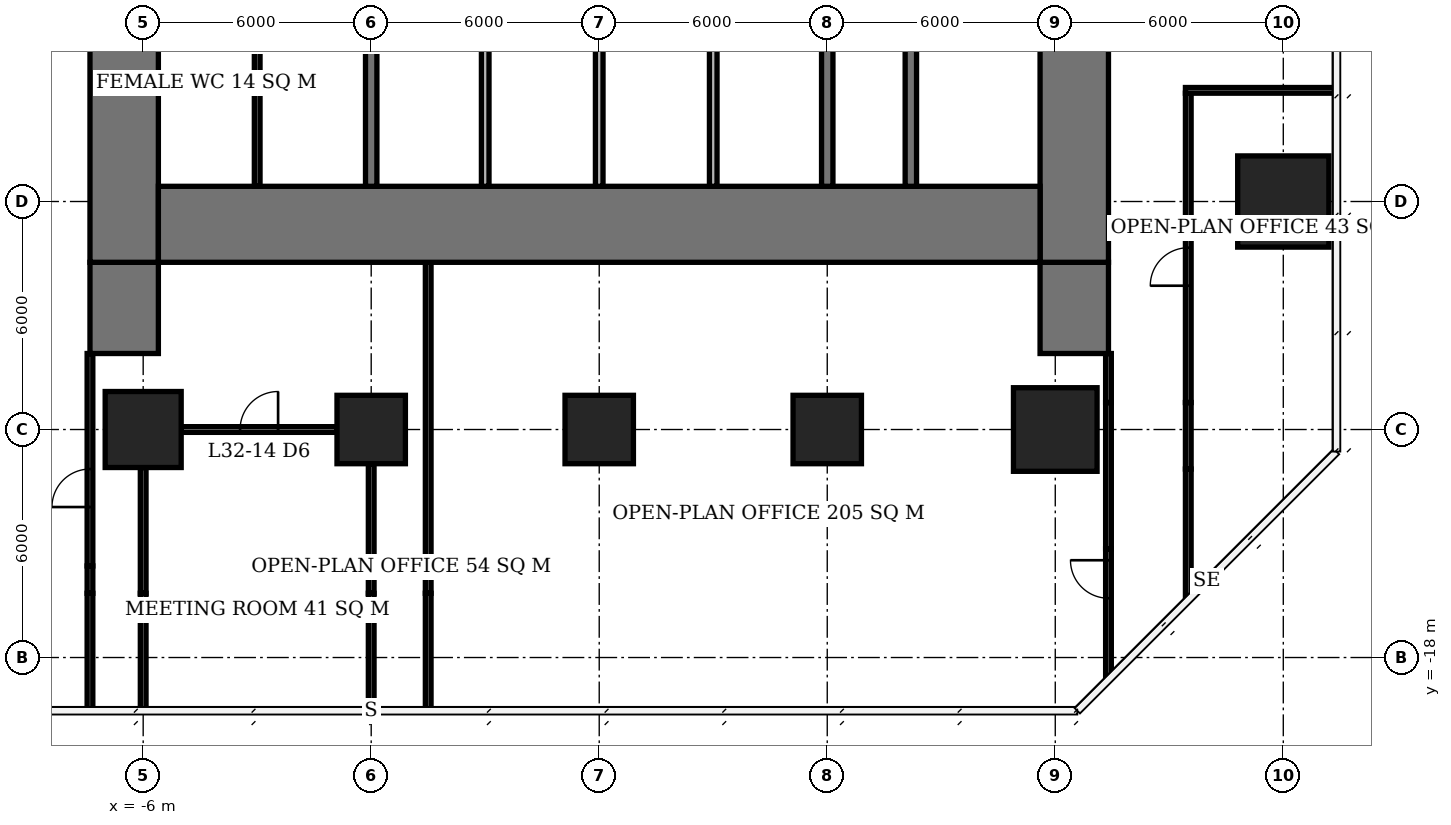
"""IFC4 building model, lengths in metres.
Left out: names, types, materials, properties, quantities, classifications, styles, units other than length and angle.
Written with IfcOpenShell. Run it as: python <this file> out.ifc"""

import sys

from ifc_helpers import new_model, si_unit, direction, frame, frame_2d, origin, origin_2d, place, context, subcontext, project, spatial, rectangle, extrude, element, fill, save


model = new_model("IFC4")
c1 = context("Model", 3, precision=1e-05, world=origin(), true_north=direction((0.0, 1.0)))
c2 = subcontext(c1, "Body", "Model", "MODEL_VIEW")
j1 = project(units=[si_unit("LENGTHUNIT", "METRE"), si_unit("PLANEANGLEUNIT", "RADIAN")], contexts=[c1])
p1 = place(None, origin())
s1 = spatial("IfcSite", under=j1, at=p1, CompositionType="ELEMENT")
p2 = place(p1, origin())
s2 = spatial("IfcBuilding", under=s1, at=p2, CompositionType="ELEMENT")
p3 = place(p2, frame((0.0, 0.0, 132.8)))
s3 = spatial("IfcBuildingStorey", under=s2, at=p3, CompositionType="ELEMENT", Elevation=132.8)
p4 = place(p3, frame((-6.0, -12.0, 0.0), z_axis=(0.0, 0.0, 1.0), x_axis=(1.0, 0.0, 0.0)))
e1 = element("IfcColumn", 1, at=p4, inside=s3, PredefinedType="COLUMN", context=c2, shape_type="SweptSolid", body=[
    extrude(rectangle(XDim=2.0, YDim=2.0, at=origin_2d()), origin(), (0.0, 0.0, 1.0), 3.9),
])
for number, where, z_axis, x_axis in (
    (2, (0.0, -12.0, 0.0), (0.0, 0.0, 1.0), (1.0, 0.0, 0.0)),
    (3, (6.0, -12.0, 0.0), (0.0, 0.0, 1.0), (1.0, 0.0, 0.0)),
    (4, (12.0, -12.0, 0.0), (0.0, 0.0, 1.0), (1.0, 0.0, 0.0)),
):
    element("IfcColumn", number, at=place(p3, frame(where, z_axis=z_axis, x_axis=x_axis)), inside=s3, PredefinedType="COLUMN", context=c2, shape_type="SweptSolid", body=[
        extrude(rectangle(XDim=1.8, YDim=1.8, at=origin_2d()), origin(), (0.0, 0.0, 1.0), 3.9),
    ])
p5 = place(p3, frame((18.0, -12.0, 0.0), z_axis=(0.0, 0.0, 1.0), x_axis=(1.0, 0.0, 0.0)))
e5 = element("IfcColumn", 5, at=p5, inside=s3, PredefinedType="COLUMN", context=c2, shape_type="SweptSolid", body=[
    extrude(rectangle(XDim=2.2, YDim=2.2, at=origin_2d()), origin(), (0.0, 0.0, 1.0), 3.9),
])
p6 = place(p3, frame((24.0, -6.0, 0.0), z_axis=(0.0, 0.0, 1.0), x_axis=(1.0, 0.0, 0.0)))
e6 = element("IfcColumn", 6, at=p6, inside=s3, PredefinedType="COLUMN", context=c2, shape_type="SweptSolid", body=[
    extrude(rectangle(XDim=2.4, YDim=2.4, at=origin_2d()), origin(), (0.0, 0.0, 1.0), 3.9),
])
p7 = place(p3, frame((-5.6, -6.6, 0.0), z_axis=(0.0, 0.0, 1.0), x_axis=(1.0, 0.0, 0.0)))
e7 = element("IfcWall", 7, at=p7, inside=s3, PredefinedType="SHEAR", context=c2, shape_type="SweptSolid", body=[
    extrude(rectangle(XDim=23.2, YDim=2.0, at=frame_2d((11.6, 0.0))), origin(), (0.0, 0.0, 1.0), 3.9),
])
p8 = place(p3, frame((-6.5, -7.6, 0.0), z_axis=(0.0, 0.0, 1.0), x_axis=(0.0, 1.0, 0.0)))
e8 = element("IfcWall", 8, at=p8, inside=s3, PredefinedType="SHEAR", context=c2, shape_type="SweptSolid", body=[
    extrude(rectangle(XDim=21.2, YDim=1.8, at=frame_2d((10.6, 0.0))), origin(), (0.0, 0.0, 1.0), 3.9),
])
p9 = place(p8, frame((7.8, 0.0, 0.0)))
e9 = element("IfcOpeningElement", 9, at=p9, cuts=e8, PredefinedType="OPENING", context=c2, shape_type="SweptSolid", body=[
    extrude(rectangle(XDim=1.8, YDim=2.4, at=frame_2d((0.9, 1.2))), frame((0.0, 0.91, 0.0), z_axis=(0.0, -1.0, 0.0), x_axis=(1.0, 0.0, 0.0)), (0.0, 0.0, 1.0), 1.82),
])
p10 = place(p3, frame((18.5, -7.6, 0.0), z_axis=(0.0, 0.0, 1.0), x_axis=(0.0, 1.0, 0.0)))
e10 = element("IfcWall", 10, at=p10, inside=s3, PredefinedType="SHEAR", context=c2, shape_type="SweptSolid", body=[
    extrude(rectangle(XDim=21.2, YDim=1.8, at=frame_2d((10.6, 0.0))), origin(), (0.0, 0.0, 1.0), 3.9),
])
p11 = place(p10, frame((9.2, 0.0, 0.0)))
e11 = element("IfcOpeningElement", 11, at=p11, cuts=e10, PredefinedType="OPENING", context=c2, shape_type="SweptSolid", body=[
    extrude(rectangle(XDim=1.8, YDim=2.4, at=frame_2d((0.9, 1.2))), frame((0.0, 0.91, 0.0), z_axis=(0.0, -1.0, 0.0), x_axis=(1.0, 0.0, 0.0)), (0.0, 0.0, 1.0), 1.82),
])
for number, where, z_axis, x_axis in (
    (12, (-6.5, -10.0, 0.0), (0.0, 0.0, 1.0), (0.0, 1.0, 0.0)),
    (13, (18.5, -10.0, 0.0), (0.0, 0.0, 1.0), (0.0, 1.0, 0.0)),
):
    element("IfcWall", number, at=place(p3, frame(where, z_axis=z_axis, x_axis=x_axis)), inside=s3, PredefinedType="SHEAR", context=c2, shape_type="SweptSolid", body=[
        extrude(rectangle(XDim=2.4, YDim=1.8, at=frame_2d((1.2, 0.0))), origin(), (0.0, 0.0, 1.0), 3.9),
    ])
for number, where, z_axis, x_axis in (
    (14, (0.0, -5.6, 0.0), (0.0, 0.0, 1.0), (0.0, 1.0, 0.0)),
    (15, (12.0, -5.6, 0.0), (0.0, 0.0, 1.0), (0.0, 1.0, 0.0)),
):
    element("IfcWall", number, at=place(p3, frame(where, z_axis=z_axis, x_axis=x_axis)), inside=s3, PredefinedType="SHEAR", context=c2, shape_type="SweptSolid", body=[
        extrude(rectangle(XDim=5.45, YDim=0.3, at=frame_2d((2.725, 0.0))), origin(), (0.0, 0.0, 1.0), 3.9),
    ])
p12 = place(p3, frame((14.2, -5.6, 0.0), z_axis=(0.0, 0.0, 1.0), x_axis=(0.0, 1.0, 0.0)))
e16 = element("IfcWall", 16, at=p12, inside=s3, PredefinedType="SHEAR", context=c2, shape_type="SweptSolid", body=[
    extrude(rectangle(XDim=8.45, YDim=0.3, at=frame_2d((4.225, 0.0))), origin(), (0.0, 0.0, 1.0), 3.9),
])
for number, where, z_axis, x_axis in (
    (17, (3.0, -5.6, 0.0), (0.0, 0.0, 1.0), (0.0, 1.0, 0.0)),
    (18, (6.0, -5.6, 0.0), (0.0, 0.0, 1.0), (0.0, 1.0, 0.0)),
    (19, (9.0, -5.6, 0.0), (0.0, 0.0, 1.0), (0.0, 1.0, 0.0)),
):
    element("IfcWall", number, at=place(p3, frame(where, z_axis=z_axis, x_axis=x_axis)), inside=s3, PredefinedType="SOLIDWALL", context=c2, shape_type="SweptSolid", body=[
        extrude(rectangle(XDim=5.45, YDim=0.2, at=frame_2d((2.725, 0.0))), origin(), (0.0, 0.0, 1.0), 3.9),
    ])
p13 = place(p3, frame((-3.0, -5.6, 0.0), z_axis=(0.0, 0.0, 1.0), x_axis=(0.0, 1.0, 0.0)))
e20 = element("IfcWall", 20, at=p13, inside=s3, PredefinedType="PLUMBINGWALL", context=c2, shape_type="SweptSolid", body=[
    extrude(rectangle(XDim=5.45, YDim=0.15, at=frame_2d((2.725, 0.0))), origin(), (0.0, 0.0, 1.0), 3.65),
])
p14 = place(p3, frame((-5.0, -12.0, 0.0), z_axis=(0.0, 0.0, 1.0), x_axis=(1.0, 0.0, 0.0)))
e21 = element("IfcWall", 21, at=p14, inside=s3, PredefinedType="PARTITIONING", context=c2, shape_type="SweptSolid", body=[
    extrude(rectangle(XDim=4.1, YDim=0.15, at=frame_2d((2.05, 0.0))), origin(), (0.0, 0.0, 1.0), 3.65),
])
p15 = place(p14, frame((1.55, 0.0, 0.0)))
e22 = element("IfcOpeningElement", 22, at=p15, cuts=e21, PredefinedType="OPENING", context=c2, shape_type="SweptSolid", body=[
    extrude(rectangle(XDim=1.0, YDim=2.1, at=frame_2d((0.5, 1.05))), frame((0.0, 0.085, 0.0), z_axis=(0.0, -1.0, 0.0), x_axis=(1.0, 0.0, 0.0)), (0.0, 0.0, 1.0), 0.17),
])
p16 = place(p3, frame((-6.0, -19.4, 0.0), z_axis=(0.0, 0.0, 1.0), x_axis=(0.0, 1.0, 0.0)))
e23 = element("IfcWall", 23, at=p16, inside=s3, PredefinedType="PARTITIONING", context=c2, shape_type="SweptSolid", body=[
    extrude(rectangle(XDim=3.09, YDim=0.15, at=frame_2d((1.545, 0.0))), origin(), (0.0, 0.0, 1.0), 3.65),
])
p17 = place(p3, frame((-6.0, -16.31, 0.0), z_axis=(0.0, 0.0, 1.0), x_axis=(0.0, 1.0, 0.0)))
e24 = element("IfcWall", 24, at=p17, inside=s3, PredefinedType="PARTITIONING", context=c2, shape_type="SweptSolid", body=[
    extrude(rectangle(XDim=3.31, YDim=0.15, at=frame_2d((1.655, 0.0))), origin(), (0.0, 0.0, 1.0), 2.65),
])
p18 = place(p3, frame((0.0, -19.35, 0.0), z_axis=(0.0, 0.0, 1.0), x_axis=(0.0, 1.0, 0.0)))
e25 = element("IfcWall", 25, at=p18, inside=s3, PredefinedType="PARTITIONING", context=c2, shape_type="SweptSolid", body=[
    extrude(rectangle(XDim=3.04, YDim=0.15, at=frame_2d((1.52, 0.0))), origin(), (0.0, 0.0, 1.0), 3.65),
])
p19 = place(p3, frame((0.0, -16.31, 0.0), z_axis=(0.0, 0.0, 1.0), x_axis=(0.0, 1.0, 0.0)))
e26 = element("IfcWall", 26, at=p19, inside=s3, PredefinedType="PARTITIONING", context=c2, shape_type="SweptSolid", body=[
    extrude(rectangle(XDim=3.41, YDim=0.15, at=frame_2d((1.705, 0.0))), origin(), (0.0, 0.0, 1.0), 2.65),
])
p20 = place(p3, frame((-7.4, -19.4, 0.0), z_axis=(0.0, 0.0, 1.0), x_axis=(0.0, 1.0, 0.0)))
e27 = element("IfcWall", 27, at=p20, inside=s3, PredefinedType="PARTITIONING", context=c2, shape_type="SweptSolid", body=[
    extrude(rectangle(XDim=3.09, YDim=0.15, at=frame_2d((1.545, 0.0))), origin(), (0.0, 0.0, 1.0), 3.65),
])
p21 = place(p3, frame((-7.4, -16.31, 0.0), z_axis=(0.0, 0.0, 1.0), x_axis=(0.0, 1.0, 0.0)))
e28 = element("IfcWall", 28, at=p21, inside=s3, PredefinedType="PARTITIONING", context=c2, shape_type="SweptSolid", body=[
    extrude(rectangle(XDim=0.72, YDim=0.15, at=frame_2d((0.36, 0.0))), origin(), (0.0, 0.0, 1.0), 2.65),
])
p22 = place(p3, frame((-7.4, -15.59, 0.0), z_axis=(0.0, 0.0, 1.0), x_axis=(0.0, 1.0, 0.0)))
e29 = element("IfcWall", 29, at=p22, inside=s3, PredefinedType="PARTITIONING", context=c2, shape_type="SweptSolid", body=[
    extrude(rectangle(XDim=5.59, YDim=0.15, at=frame_2d((2.795, 0.0))), origin(), (0.0, 0.0, 1.0), 3.65),
])
p23 = place(p22, frame((1.55, 0.0, 0.0)))
e30 = element("IfcOpeningElement", 30, at=p23, cuts=e29, PredefinedType="OPENING", context=c2, shape_type="SweptSolid", body=[
    extrude(rectangle(XDim=1.0, YDim=2.1, at=frame_2d((0.5, 1.05))), frame((0.0, 0.085, 0.0), z_axis=(0.0, -1.0, 0.0), x_axis=(1.0, 0.0, 0.0)), (0.0, 0.0, 1.0), 0.17),
])
p24 = place(p3, frame((1.5, -19.4, 0.0), z_axis=(0.0, 0.0, 1.0), x_axis=(0.0, 1.0, 0.0)))
e31 = element("IfcWall", 31, at=p24, inside=s3, PredefinedType="PARTITIONING", context=c2, shape_type="SweptSolid", body=[
    extrude(rectangle(XDim=3.09, YDim=0.15, at=frame_2d((1.545, 0.0))), origin(), (0.0, 0.0, 1.0), 3.65),
])
p25 = place(p3, frame((1.5, -16.31, 0.0), z_axis=(0.0, 0.0, 1.0), x_axis=(0.0, 1.0, 0.0)))
e32 = element("IfcWall", 32, at=p25, inside=s3, PredefinedType="PARTITIONING", context=c2, shape_type="SweptSolid", body=[
    extrude(rectangle(XDim=0.72, YDim=0.15, at=frame_2d((0.36, 0.0))), origin(), (0.0, 0.0, 1.0), 2.65),
])
p26 = place(p3, frame((1.5, -15.59, 0.0), z_axis=(0.0, 0.0, 1.0), x_axis=(0.0, 1.0, 0.0)))
e33 = element("IfcWall", 33, at=p26, inside=s3, PredefinedType="PARTITIONING", context=c2, shape_type="SweptSolid", body=[
    extrude(rectangle(XDim=7.99, YDim=0.15, at=frame_2d((3.995, 0.0))), origin(), (0.0, 0.0, 1.0), 3.65),
])
p27 = place(p3, frame((19.4, -18.489, 0.0), z_axis=(0.0, 0.0, 1.0), x_axis=(0.0, 1.0, 0.0)))
e34 = element("IfcWall", 34, at=p27, inside=s3, PredefinedType="PARTITIONING", context=c2, shape_type="SweptSolid", body=[
    extrude(rectangle(XDim=3.349, YDim=0.15, at=frame_2d((1.675, 0.0))), origin(), (0.0, 0.0, 1.0), 3.65),
])
p28 = place(p27, frame((2.049, 0.0, 0.0)))
e35 = element("IfcOpeningElement", 35, at=p28, cuts=e34, PredefinedType="OPENING", context=c2, shape_type="SweptSolid", body=[
    extrude(rectangle(XDim=1.0, YDim=2.1, at=frame_2d((0.5, 1.05))), frame((0.0, 0.085, 0.0), z_axis=(0.0, -1.0, 0.0), x_axis=(1.0, 0.0, 0.0)), (0.0, 0.0, 1.0), 0.17),
])
p29 = place(p3, frame((19.4, -15.14, 0.0), z_axis=(0.0, 0.0, 1.0), x_axis=(0.0, 1.0, 0.0)))
e36 = element("IfcWall", 36, at=p29, inside=s3, PredefinedType="PARTITIONING", context=c2, shape_type="SweptSolid", body=[
    extrude(rectangle(XDim=3.85, YDim=0.15, at=frame_2d((1.925, 0.0))), origin(), (0.0, 0.0, 1.0), 2.65),
])
p30 = place(p3, frame((19.4, -11.29, 0.0), z_axis=(0.0, 0.0, 1.0), x_axis=(0.0, 1.0, 0.0)))
e37 = element("IfcWall", 37, at=p30, inside=s3, PredefinedType="PARTITIONING", context=c2, shape_type="SweptSolid", body=[
    extrude(rectangle(XDim=1.29, YDim=0.15, at=frame_2d((0.645, 0.0))), origin(), (0.0, 0.0, 1.0), 3.65),
])
p31 = place(p3, frame((21.5, -16.388, 0.0), z_axis=(0.0, 0.0, 1.0), x_axis=(0.0, 1.0, 0.0)))
e38 = element("IfcWall", 38, at=p31, inside=s3, PredefinedType="PARTITIONING", context=c2, shape_type="SweptSolid", body=[
    extrude(rectangle(XDim=3.348, YDim=0.15, at=frame_2d((1.674, 0.0))), origin(), (0.0, 0.0, 1.0), 3.65),
])
p32 = place(p3, frame((21.5, -13.04, 0.0), z_axis=(0.0, 0.0, 1.0), x_axis=(0.0, 1.0, 0.0)))
e39 = element("IfcWall", 39, at=p32, inside=s3, PredefinedType="PARTITIONING", context=c2, shape_type="SweptSolid", body=[
    extrude(rectangle(XDim=1.75, YDim=0.15, at=frame_2d((0.875, 0.0))), origin(), (0.0, 0.0, 1.0), 2.65),
])
p33 = place(p3, frame((21.5, -11.29, 0.0), z_axis=(0.0, 0.0, 1.0), x_axis=(0.0, 1.0, 0.0)))
e40 = element("IfcWall", 40, at=p33, inside=s3, PredefinedType="PARTITIONING", context=c2, shape_type="SweptSolid", body=[
    extrude(rectangle(XDim=8.14, YDim=0.15, at=frame_2d((4.07, 0.0))), origin(), (0.0, 0.0, 1.0), 3.65),
])
p34 = place(p33, frame((3.074, 0.0, 0.0)))
e41 = element("IfcOpeningElement", 41, at=p34, cuts=e40, PredefinedType="OPENING", context=c2, shape_type="SweptSolid", body=[
    extrude(rectangle(XDim=1.0, YDim=2.1, at=frame_2d((0.5, 1.05))), frame((0.0, 0.085, 0.0), z_axis=(0.0, -1.0, 0.0), x_axis=(1.0, 0.0, 0.0)), (0.0, 0.0, 1.0), 0.17),
])
p35 = place(p3, frame((21.425, -3.075, 0.0), z_axis=(0.0, 0.0, 1.0), x_axis=(1.0, 0.0, 0.0)))
e42 = element("IfcWall", 42, at=p35, inside=s3, PredefinedType="PARTITIONING", context=c2, shape_type="SweptSolid", body=[
    extrude(rectangle(XDim=3.975, YDim=0.15, at=frame_2d((1.987, 0.0))), origin(), (0.0, 0.0, 1.0), 3.65),
])
p36 = place(p15, origin())
e43 = element("IfcDoor", 43, at=p36, inside=s3, OperationType="SINGLE_SWING_RIGHT", PredefinedType="DOOR", context=c2, shape_type="SweptSolid", body=[
    extrude(rectangle(XDim=1.0, YDim=2.1, at=frame_2d((0.5, 1.05))), frame((0.0, 0.025, 0.0), z_axis=(0.0, -1.0, 0.0), x_axis=(1.0, 0.0, 0.0)), (0.0, 0.0, 1.0), 0.05),
])
fill(e22, e43)
p37 = place(p28, origin())
e44 = element("IfcDoor", 44, at=p37, inside=s3, OperationType="SINGLE_SWING_RIGHT", PredefinedType="DOOR", context=c2, shape_type="SweptSolid", body=[
    extrude(rectangle(XDim=1.0, YDim=2.1, at=frame_2d((0.5, 1.05))), frame((0.0, 0.025, 0.0), z_axis=(0.0, -1.0, 0.0), x_axis=(1.0, 0.0, 0.0)), (0.0, 0.0, 1.0), 0.05),
])
fill(e35, e44)
p38 = place(p23, origin())
e45 = element("IfcDoor", 45, at=p38, inside=s3, OperationType="SINGLE_SWING_LEFT", PredefinedType="DOOR", context=c2, shape_type="SweptSolid", body=[
    extrude(rectangle(XDim=1.0, YDim=2.1, at=frame_2d((0.5, 1.05))), frame((0.0, 0.025, 0.0), z_axis=(0.0, -1.0, 0.0), x_axis=(1.0, 0.0, 0.0)), (0.0, 0.0, 1.0), 0.05),
])
fill(e30, e45)
p39 = place(p34, origin())
e46 = element("IfcDoor", 46, at=p39, inside=s3, OperationType="SINGLE_SWING_LEFT", PredefinedType="DOOR", context=c2, shape_type="SweptSolid", body=[
    extrude(rectangle(XDim=1.0, YDim=2.1, at=frame_2d((0.5, 1.05))), frame((0.0, 0.025, 0.0), z_axis=(0.0, -1.0, 0.0), x_axis=(1.0, 0.0, 0.0)), (0.0, 0.0, 1.0), 0.05),
])
fill(e41, e46)
save(model, sys.argv[1])
